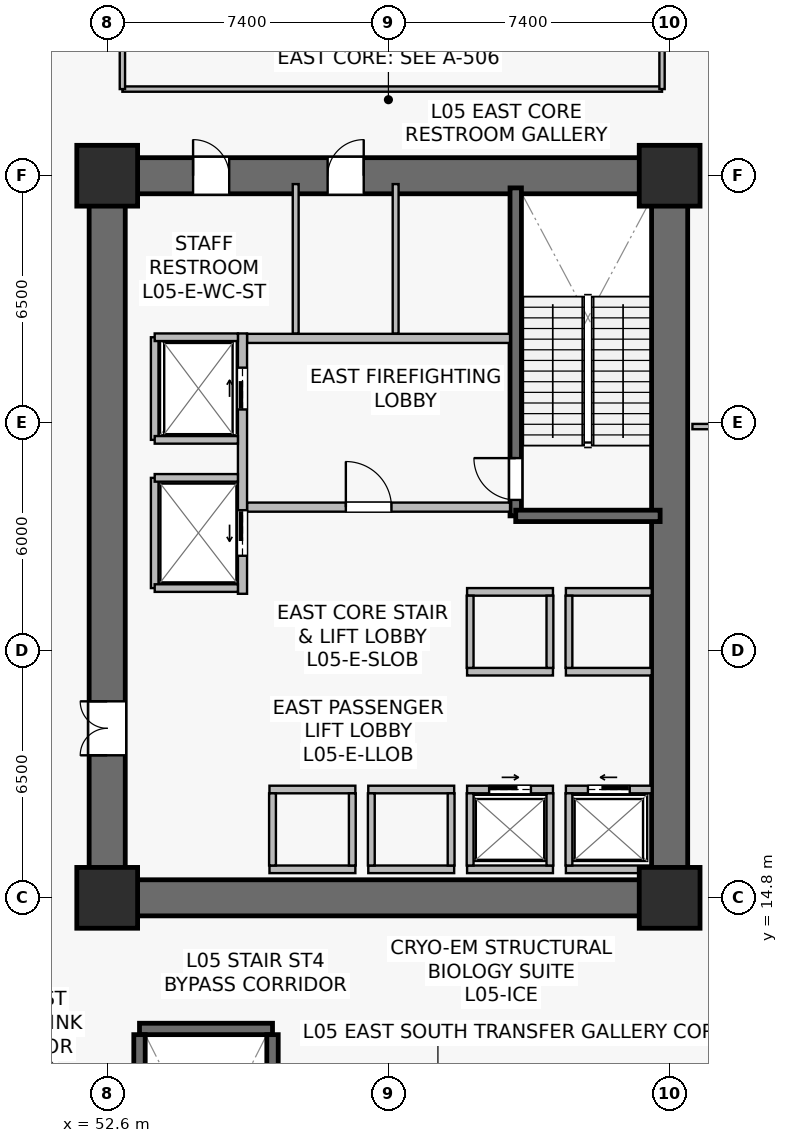
"""IFC4 building model, lengths in metres.
Left out: names, types, materials, properties, quantities, classifications, styles, units other than length and angle.
Written with IfcOpenShell. Run it as: python <this file> out.ifc"""

import sys

from ifc_helpers import new_model, si_unit, direction, frame, frame_2d, origin, origin_2d, place, context, subcontext, project, spatial, rectangle, extrude, source, transform, mapped, element, fill, save


model = new_model("IFC4")
c1 = context("Model", 3, precision=1e-05, world=origin(), true_north=direction((0.0, 1.0)))
c2 = subcontext(c1, "Body", "Model", "MODEL_VIEW")
j1 = project(units=[si_unit("LENGTHUNIT", "METRE"), si_unit("PLANEANGLEUNIT", "RADIAN")], contexts=[c1])
p1 = place(None, origin())
s1 = spatial("IfcSite", under=j1, at=p1, CompositionType="ELEMENT")
p2 = place(p1, origin())
s2 = spatial("IfcBuilding", under=s1, at=p2, CompositionType="ELEMENT")
p3 = place(p2, frame((0.0, 0.0, 19.8)))
s3 = spatial("IfcBuildingStorey", under=s2, at=p3, CompositionType="ELEMENT", Elevation=19.8)
p4 = place(p3, frame((52.125, 14.8, 0.0), z_axis=(0.0, 0.0, 1.0), x_axis=(1.0, 0.0, 0.0)))
e1 = element("IfcWall", 1, at=p4, inside=s3, PredefinedType="SHEAR", context=c2, shape_type="SweptSolid", body=[
    extrude(rectangle(XDim=15.75, YDim=0.95, at=frame_2d((7.875, 0.0))), origin(), (0.0, 0.0, 1.0), 5.08),
])
p5 = place(p3, frame((52.125, 33.8, 0.0), z_axis=(0.0, 0.0, 1.0), x_axis=(1.0, 0.0, 0.0)))
e2 = element("IfcWall", 2, at=p5, inside=s3, PredefinedType="SHEAR", context=c2, shape_type="SweptSolid", body=[
    extrude(rectangle(XDim=15.75, YDim=0.95, at=frame_2d((7.875, 0.0))), origin(), (0.0, 0.0, 1.0), 5.08),
])
p6 = place(p5, frame((6.275, 0.0, 0.0)))
e3 = element("IfcOpeningElement", 3, at=p6, cuts=e2, PredefinedType="OPENING", context=c2, shape_type="SweptSolid", body=[
    extrude(rectangle(XDim=0.95, YDim=2.15, at=frame_2d((0.475, 1.075))), frame((0.0, 0.485, 0.0), z_axis=(0.0, -1.0, 0.0), x_axis=(1.0, 0.0, 0.0)), (0.0, 0.0, 1.0), 0.97),
])
p7 = place(p5, frame((2.735, 0.0, 0.0)))
e4 = element("IfcOpeningElement", 4, at=p7, cuts=e2, PredefinedType="OPENING", context=c2, shape_type="SweptSolid", body=[
    extrude(rectangle(XDim=0.95, YDim=2.15, at=frame_2d((0.475, 1.075))), frame((0.0, 0.485, 0.0), z_axis=(0.0, -1.0, 0.0), x_axis=(1.0, 0.0, 0.0)), (0.0, 0.0, 1.0), 0.97),
])
p8 = place(p3, frame((52.6, 15.275, 0.0), z_axis=(0.0, 0.0, 1.0), x_axis=(0.0, 1.0, 0.0)))
e5 = element("IfcWall", 5, at=p8, inside=s3, PredefinedType="SHEAR", context=c2, shape_type="SweptSolid", body=[
    extrude(rectangle(XDim=18.05, YDim=0.95, at=frame_2d((9.025, 0.0))), origin(), (0.0, 0.0, 1.0), 5.08),
])
p9 = place(p8, frame((3.275, 0.0, 0.0)))
e6 = element("IfcOpeningElement", 6, at=p9, cuts=e5, PredefinedType="OPENING", context=c2, shape_type="SweptSolid", body=[
    extrude(rectangle(XDim=1.42, YDim=2.2, at=frame_2d((0.71, 1.1))), frame((0.0, 0.485, 0.0), z_axis=(0.0, -1.0, 0.0), x_axis=(1.0, 0.0, 0.0)), (0.0, 0.0, 1.0), 0.97),
])
p10 = place(p3, frame((67.4, 15.275, 0.0), z_axis=(0.0, 0.0, 1.0), x_axis=(0.0, 1.0, 0.0)))
e7 = element("IfcWall", 7, at=p10, inside=s3, PredefinedType="SHEAR", context=c2, shape_type="SweptSolid", body=[
    extrude(rectangle(XDim=18.05, YDim=0.95, at=frame_2d((9.025, 0.0))), origin(), (0.0, 0.0, 1.0), 5.08),
])
p11 = place(p3, frame((63.35, 24.85, 0.0), z_axis=(0.0, 0.0, 1.0), x_axis=(0.0, 1.0, 0.0)))
e8 = element("IfcWall", 8, at=p11, inside=s3, PredefinedType="SHEAR", context=c2, shape_type="SweptSolid", body=[
    extrude(rectangle(XDim=8.63, YDim=0.3, at=frame_2d((4.315, 0.0))), origin(), (0.0, 0.0, 1.0), 5.08),
])
p12 = place(p11, frame((0.42, 0.0, 0.0)))
e9 = element("IfcOpeningElement", 9, at=p12, cuts=e8, PredefinedType="OPENING", context=c2, shape_type="SweptSolid", body=[
    extrude(rectangle(XDim=1.1, YDim=2.15, at=frame_2d((0.55, 1.075))), frame((0.0, 0.16, 0.0), z_axis=(0.0, -1.0, 0.0), x_axis=(1.0, 0.0, 0.0)), (0.0, 0.0, 1.0), 0.32),
])
p13 = place(p3, frame((63.35, 24.85, 0.0), z_axis=(0.0, 0.0, 1.0), x_axis=(1.0, 0.0, 0.0)))
e10 = element("IfcWall", 10, at=p13, inside=s3, PredefinedType="SHEAR", context=c2, shape_type="SweptSolid", body=[
    extrude(rectangle(XDim=3.8, YDim=0.3, at=frame_2d((1.9, 0.0))), origin(), (0.0, 0.0, 1.0), 5.08),
])
p14 = place(p3, frame((53.45, 11.35, 0.0), z_axis=(0.0, 0.0, 1.0), x_axis=(1.0, 0.0, 0.0)))
e11 = element("IfcWall", 11, at=p14, inside=s3, PredefinedType="SHEAR", context=c2, shape_type="SweptSolid", body=[
    extrude(rectangle(XDim=3.5, YDim=0.3, at=frame_2d((1.75, 0.0))), origin(), (0.0, 0.0, 1.0), 5.08),
])
p15 = place(p3, frame((53.45, 3.2, 0.0), z_axis=(0.0, 0.0, 1.0), x_axis=(0.0, 1.0, 0.0)))
e12 = element("IfcWall", 12, at=p15, inside=s3, PredefinedType="SHEAR", context=c2, shape_type="SweptSolid", body=[
    extrude(rectangle(XDim=8.0, YDim=0.3, at=frame_2d((4.0, 0.0))), origin(), (0.0, 0.0, 1.0), 5.08),
])
p16 = place(p3, frame((56.95, 3.2, 0.0), z_axis=(0.0, 0.0, 1.0), x_axis=(0.0, 1.0, 0.0)))
e13 = element("IfcWall", 13, at=p16, inside=s3, PredefinedType="SHEAR", context=c2, shape_type="SweptSolid", body=[
    extrude(rectangle(XDim=8.0, YDim=0.3, at=frame_2d((4.0, 0.0))), origin(), (0.0, 0.0, 1.0), 5.08),
])
p17 = place(p16, frame((0.25, 0.0, 0.0)))
e14 = element("IfcOpeningElement", 14, at=p17, cuts=e13, PredefinedType="OPENING", context=c2, shape_type="SweptSolid", body=[
    extrude(rectangle(XDim=1.1, YDim=2.15, at=frame_2d((0.55, 1.075))), frame((0.0, 0.16, 0.0), z_axis=(0.0, -1.0, 0.0), x_axis=(1.0, 0.0, 0.0)), (0.0, 0.0, 1.0), 0.32),
])
m1 = source(origin(), c2, "Body", "SweptSolid", [
    extrude(rectangle(XDim=1.6, YDim=1.6, at=origin_2d()), origin(), (0.0, 0.0, 1.0), 5.4),
])
for number, where, z_axis, x_axis in (
    (15, (52.6, 14.8, 0.0), (0.0, 0.0, 1.0), (1.0, 0.0, 0.0)),
    (16, (67.4, 14.8, 0.0), (0.0, 0.0, 1.0), (1.0, 0.0, 0.0)),
    (17, (52.6, 33.8, 0.0), (0.0, 0.0, 1.0), (1.0, 0.0, 0.0)),
    (18, (67.4, 33.8, 0.0), (0.0, 0.0, 1.0), (1.0, 0.0, 0.0)),
):
    element("IfcColumn", number, at=place(p3, frame(where, z_axis=z_axis, x_axis=x_axis)), inside=s3, PredefinedType="COLUMN", context=c2, shape_type="MappedRepresentation", body=[
        mapped(m1, transform((0.0, 0.0, 0.0), scale=1.0)),
    ])
p18 = place(p3, frame((56.28, 25.08, 0.0), z_axis=(0.0, 0.0, 1.0), x_axis=(1.0, 0.0, 0.0)))
e19 = element("IfcWall", 19, at=p18, inside=s3, PredefinedType="SOLIDWALL", context=c2, shape_type="SweptSolid", body=[
    extrude(rectangle(XDim=6.92, YDim=0.24, at=frame_2d((3.46, 0.0))), origin(), (0.0, 0.0, 1.0), 4.365),
])
p19 = place(p18, frame((2.6, 0.0, 0.0)))
e20 = element("IfcOpeningElement", 20, at=p19, cuts=e19, PredefinedType="OPENING", context=c2, shape_type="SweptSolid", body=[
    extrude(rectangle(XDim=1.2, YDim=2.16, at=frame_2d((0.6, 1.08))), frame((0.0, 0.13, 0.0), z_axis=(0.0, -1.0, 0.0), x_axis=(1.0, 0.0, 0.0)), (0.0, 0.0, 1.0), 0.26),
])
p20 = place(p3, frame((56.28, 29.52, 0.0), z_axis=(0.0, 0.0, 1.0), x_axis=(1.0, 0.0, 0.0)))
e21 = element("IfcWall", 21, at=p20, inside=s3, PredefinedType="SOLIDWALL", context=c2, shape_type="SweptSolid", body=[
    extrude(rectangle(XDim=6.92, YDim=0.24, at=frame_2d((3.46, 0.0))), origin(), (0.0, 0.0, 1.0), 4.365),
])
p21 = place(p3, frame((56.16, 22.8, 0.0), z_axis=(0.0, 0.0, 1.0), x_axis=(0.0, 1.0, 0.0)))
e22 = element("IfcWall", 22, at=p21, inside=s3, PredefinedType="SOLIDWALL", context=c2, shape_type="SweptSolid", body=[
    extrude(rectangle(XDim=6.85, YDim=0.24, at=frame_2d((3.425, 0.0))), origin(), (0.0, 0.0, 1.0), 4.165),
])
p22 = place(p21, frame((4.85, 0.0, 0.0)))
e23 = element("IfcOpeningElement", 23, at=p22, cuts=e22, PredefinedType="OPENING", context=c2, shape_type="SweptSolid", body=[
    extrude(rectangle(XDim=1.1, YDim=2.22, at=frame_2d((0.55, 1.11))), frame((0.0, 0.13, 0.0), z_axis=(0.0, -1.0, 0.0), x_axis=(1.0, 0.0, 0.0)), (0.0, 0.0, 1.0), 0.26),
])
p23 = place(p21, frame((1.0, 0.0, 0.0)))
e24 = element("IfcOpeningElement", 24, at=p23, cuts=e22, PredefinedType="OPENING", context=c2, shape_type="SweptSolid", body=[
    extrude(rectangle(XDim=1.2, YDim=2.22, at=frame_2d((0.6, 1.11))), frame((0.0, 0.13, 0.0), z_axis=(0.0, -1.0, 0.0), x_axis=(1.0, 0.0, 0.0)), (0.0, 0.0, 1.0), 0.26),
])
p24 = place(p3, frame((64.67, 17.65, 0.0), z_axis=(0.0, 0.0, 1.0), x_axis=(1.0, 0.0, 0.0)))
e25 = element("IfcWall", 25, at=p24, inside=s3, PredefinedType="SOLIDWALL", context=c2, shape_type="SweptSolid", body=[
    extrude(rectangle(XDim=2.26, YDim=0.2, at=frame_2d((1.13, 0.0))), origin(), (0.0, 0.0, 1.0), 5.08),
])
p25 = place(p24, frame((0.58, 0.0, 0.0)))
e26 = element("IfcOpeningElement", 26, at=p25, cuts=e25, PredefinedType="OPENING", context=c2, shape_type="SweptSolid", body=[
    extrude(rectangle(XDim=1.1, YDim=2.22, at=frame_2d((0.55, 1.11))), frame((0.0, 0.11, 0.0), z_axis=(0.0, -1.0, 0.0), x_axis=(1.0, 0.0, 0.0)), (0.0, 0.0, 1.0), 0.22),
])
p26 = place(p3, frame((64.67, 15.55, 0.0), z_axis=(0.0, 0.0, 1.0), x_axis=(1.0, 0.0, 0.0)))
e27 = element("IfcWall", 27, at=p26, inside=s3, PredefinedType="SOLIDWALL", context=c2, shape_type="SweptSolid", body=[
    extrude(rectangle(XDim=2.26, YDim=0.2, at=frame_2d((1.13, 0.0))), origin(), (0.0, 0.0, 1.0), 5.08),
])
p27 = place(p3, frame((64.75, 15.65, 0.0), z_axis=(0.0, 0.0, 1.0), x_axis=(0.0, 1.0, 0.0)))
e28 = element("IfcWall", 28, at=p27, inside=s3, PredefinedType="SOLIDWALL", context=c2, shape_type="SweptSolid", body=[
    extrude(rectangle(XDim=1.9, YDim=0.18, at=frame_2d((0.95, 0.0))), origin(), (0.0, 0.0, 1.0), 5.08),
])
p28 = place(p3, frame((62.07, 17.65, 0.0), z_axis=(0.0, 0.0, 1.0), x_axis=(1.0, 0.0, 0.0)))
e29 = element("IfcWall", 29, at=p28, inside=s3, PredefinedType="SOLIDWALL", context=c2, shape_type="SweptSolid", body=[
    extrude(rectangle(XDim=2.26, YDim=0.2, at=frame_2d((1.13, 0.0))), origin(), (0.0, 0.0, 1.0), 5.08),
])
p29 = place(p28, frame((0.58, 0.0, 0.0)))
e30 = element("IfcOpeningElement", 30, at=p29, cuts=e29, PredefinedType="OPENING", context=c2, shape_type="SweptSolid", body=[
    extrude(rectangle(XDim=1.1, YDim=2.22, at=frame_2d((0.55, 1.11))), frame((0.0, 0.11, 0.0), z_axis=(0.0, -1.0, 0.0), x_axis=(1.0, 0.0, 0.0)), (0.0, 0.0, 1.0), 0.22),
])
p30 = place(p3, frame((62.07, 15.55, 0.0), z_axis=(0.0, 0.0, 1.0), x_axis=(1.0, 0.0, 0.0)))
e31 = element("IfcWall", 31, at=p30, inside=s3, PredefinedType="SOLIDWALL", context=c2, shape_type="SweptSolid", body=[
    extrude(rectangle(XDim=2.26, YDim=0.2, at=frame_2d((1.13, 0.0))), origin(), (0.0, 0.0, 1.0), 5.08),
])
for number, where, z_axis, x_axis in (
    (32, (62.15, 15.65, 0.0), (0.0, 0.0, 1.0), (0.0, 1.0, 0.0)),
    (33, (64.25, 15.65, 0.0), (0.0, 0.0, 1.0), (0.0, 1.0, 0.0)),
):
    element("IfcWall", number, at=place(p3, frame(where, z_axis=z_axis, x_axis=x_axis)), inside=s3, PredefinedType="SOLIDWALL", context=c2, shape_type="SweptSolid", body=[
        extrude(rectangle(XDim=1.9, YDim=0.18, at=frame_2d((0.95, 0.0))), origin(), (0.0, 0.0, 1.0), 5.08),
    ])
for number, where, z_axis, x_axis in (
    (34, (59.47, 17.65, 0.0), (0.0, 0.0, 1.0), (1.0, 0.0, 0.0)),
    (35, (59.47, 15.55, 0.0), (0.0, 0.0, 1.0), (1.0, 0.0, 0.0)),
):
    element("IfcWall", number, at=place(p3, frame(where, z_axis=z_axis, x_axis=x_axis)), inside=s3, PredefinedType="SOLIDWALL", context=c2, shape_type="SweptSolid", body=[
        extrude(rectangle(XDim=2.26, YDim=0.2, at=frame_2d((1.13, 0.0))), origin(), (0.0, 0.0, 1.0), 4.365),
    ])
for number, where, z_axis, x_axis in (
    (36, (59.55, 15.65, 0.0), (0.0, 0.0, 1.0), (0.0, 1.0, 0.0)),
    (37, (61.65, 15.65, 0.0), (0.0, 0.0, 1.0), (0.0, 1.0, 0.0)),
):
    element("IfcWall", number, at=place(p3, frame(where, z_axis=z_axis, x_axis=x_axis)), inside=s3, PredefinedType="SOLIDWALL", context=c2, shape_type="SweptSolid", body=[
        extrude(rectangle(XDim=1.9, YDim=0.18, at=frame_2d((0.95, 0.0))), origin(), (0.0, 0.0, 1.0), 5.08),
    ])
for number, where, z_axis, x_axis in (
    (38, (56.87, 17.65, 0.0), (0.0, 0.0, 1.0), (1.0, 0.0, 0.0)),
    (39, (56.87, 15.55, 0.0), (0.0, 0.0, 1.0), (1.0, 0.0, 0.0)),
):
    element("IfcWall", number, at=place(p3, frame(where, z_axis=z_axis, x_axis=x_axis)), inside=s3, PredefinedType="SOLIDWALL", context=c2, shape_type="SweptSolid", body=[
        extrude(rectangle(XDim=2.26, YDim=0.2, at=frame_2d((1.13, 0.0))), origin(), (0.0, 0.0, 1.0), 5.08),
    ])
for number, where, z_axis, x_axis in (
    (40, (56.95, 15.65, 0.0), (0.0, 0.0, 1.0), (0.0, 1.0, 0.0)),
    (41, (59.05, 15.65, 0.0), (0.0, 0.0, 1.0), (0.0, 1.0, 0.0)),
):
    element("IfcWall", number, at=place(p3, frame(where, z_axis=z_axis, x_axis=x_axis)), inside=s3, PredefinedType="SOLIDWALL", context=c2, shape_type="SweptSolid", body=[
        extrude(rectangle(XDim=1.9, YDim=0.18, at=frame_2d((0.95, 0.0))), origin(), (0.0, 0.0, 1.0), 5.08),
    ])
for number, where, z_axis, x_axis in (
    (42, (64.67, 20.75, 0.0), (0.0, 0.0, 1.0), (1.0, 0.0, 0.0)),
    (43, (64.67, 22.85, 0.0), (0.0, 0.0, 1.0), (1.0, 0.0, 0.0)),
):
    element("IfcWall", number, at=place(p3, frame(where, z_axis=z_axis, x_axis=x_axis)), inside=s3, PredefinedType="SOLIDWALL", context=c2, shape_type="SweptSolid", body=[
        extrude(rectangle(XDim=2.26, YDim=0.2, at=frame_2d((1.13, 0.0))), origin(), (0.0, 0.0, 1.0), 5.08),
    ])
p31 = place(p3, frame((64.75, 20.85, 0.0), z_axis=(0.0, 0.0, 1.0), x_axis=(0.0, 1.0, 0.0)))
e44 = element("IfcWall", 44, at=p31, inside=s3, PredefinedType="SOLIDWALL", context=c2, shape_type="SweptSolid", body=[
    extrude(rectangle(XDim=1.9, YDim=0.18, at=frame_2d((0.95, 0.0))), origin(), (0.0, 0.0, 1.0), 5.08),
])
for number, where, z_axis, x_axis in (
    (45, (62.07, 20.75, 0.0), (0.0, 0.0, 1.0), (1.0, 0.0, 0.0)),
    (46, (62.07, 22.85, 0.0), (0.0, 0.0, 1.0), (1.0, 0.0, 0.0)),
):
    element("IfcWall", number, at=place(p3, frame(where, z_axis=z_axis, x_axis=x_axis)), inside=s3, PredefinedType="SOLIDWALL", context=c2, shape_type="SweptSolid", body=[
        extrude(rectangle(XDim=2.26, YDim=0.2, at=frame_2d((1.13, 0.0))), origin(), (0.0, 0.0, 1.0), 5.08),
    ])
for number, where, z_axis, x_axis in (
    (47, (62.15, 20.85, 0.0), (0.0, 0.0, 1.0), (0.0, 1.0, 0.0)),
    (48, (64.25, 20.85, 0.0), (0.0, 0.0, 1.0), (0.0, 1.0, 0.0)),
):
    element("IfcWall", number, at=place(p3, frame(where, z_axis=z_axis, x_axis=x_axis)), inside=s3, PredefinedType="SOLIDWALL", context=c2, shape_type="SweptSolid", body=[
        extrude(rectangle(XDim=1.9, YDim=0.18, at=frame_2d((0.95, 0.0))), origin(), (0.0, 0.0, 1.0), 5.08),
    ])
p32 = place(p3, frame((53.85, 26.85, 0.0), z_axis=(0.0, 0.0, 1.0), x_axis=(0.0, 1.0, 0.0)))
e49 = element("IfcWall", 49, at=p32, inside=s3, PredefinedType="SOLIDWALL", context=c2, shape_type="SweptSolid", body=[
    extrude(rectangle(XDim=2.7, YDim=0.2, at=frame_2d((1.35, 0.0))), origin(), (0.0, 0.0, 1.0), 5.08),
])
p33 = place(p3, frame((53.85, 29.55, 0.0), z_axis=(0.0, 0.0, 1.0), x_axis=(1.0, 0.0, 0.0)))
e50 = element("IfcWall", 50, at=p33, inside=s3, PredefinedType="SOLIDWALL", context=c2, shape_type="SweptSolid", body=[
    extrude(rectangle(XDim=2.19, YDim=0.2, at=frame_2d((1.095, 0.0))), origin(), (0.0, 0.0, 1.0), 5.08),
])
p34 = place(p3, frame((53.85, 26.85, 0.0), z_axis=(0.0, 0.0, 1.0), x_axis=(1.0, 0.0, 0.0)))
e51 = element("IfcWall", 51, at=p34, inside=s3, PredefinedType="SOLIDWALL", context=c2, shape_type="SweptSolid", body=[
    extrude(rectangle(XDim=2.19, YDim=0.2, at=frame_2d((1.095, 0.0))), origin(), (0.0, 0.0, 1.0), 4.477),
])
p35 = place(p3, frame((53.85, 22.95, 0.0), z_axis=(0.0, 0.0, 1.0), x_axis=(0.0, 1.0, 0.0)))
e52 = element("IfcWall", 52, at=p35, inside=s3, PredefinedType="SOLIDWALL", context=c2, shape_type="SweptSolid", body=[
    extrude(rectangle(XDim=2.9, YDim=0.2, at=frame_2d((1.45, 0.0))), origin(), (0.0, 0.0, 1.0), 4.165),
])
for number, where, z_axis, x_axis in (
    (53, (53.85, 25.85, 0.0), (0.0, 0.0, 1.0), (1.0, 0.0, 0.0)),
    (54, (53.85, 22.95, 0.0), (0.0, 0.0, 1.0), (1.0, 0.0, 0.0)),
):
    element("IfcWall", number, at=place(p3, frame(where, z_axis=z_axis, x_axis=x_axis)), inside=s3, PredefinedType="SOLIDWALL", context=c2, shape_type="SweptSolid", body=[
        extrude(rectangle(XDim=2.19, YDim=0.2, at=frame_2d((1.095, 0.0))), origin(), (0.0, 0.0, 1.0), 5.08),
    ])
p36 = place(p3, frame((60.19, 29.65, 0.0), z_axis=(0.0, 0.0, 1.0), x_axis=(0.0, 1.0, 0.0)))
e55 = element("IfcWall", 55, at=p36, inside=s3, PredefinedType="PLUMBINGWALL", context=c2, shape_type="SweptSolid", body=[
    extrude(rectangle(XDim=3.93, YDim=0.155, at=frame_2d((1.965, 0.0))), origin(), (0.0, 0.0, 1.0), 4.365),
])
p37 = place(p3, frame((57.56, 29.65, 0.0), z_axis=(0.0, 0.0, 1.0), x_axis=(0.0, 1.0, 0.0)))
e56 = element("IfcWall", 56, at=p37, inside=s3, PredefinedType="PLUMBINGWALL", context=c2, shape_type="SweptSolid", body=[
    extrude(rectangle(XDim=3.93, YDim=0.155, at=frame_2d((1.965, 0.0))), origin(), (0.0, 0.0, 1.0), 5.08),
])
p38 = place(p3, frame((53.0, 36.08, 0.0), z_axis=(0.0, 0.0, 1.0), x_axis=(1.0, 0.0, 0.0)))
e57 = element("IfcWall", 57, at=p38, inside=s3, PredefinedType="PARTITIONING", context=c2, shape_type="SweptSolid", body=[
    extrude(rectangle(XDim=14.2, YDim=0.14, at=frame_2d((7.1, 0.0))), origin(), (0.0, 0.0, 1.0), 4.365),
])
p39 = place(p3, frame((53.0, 36.08, 0.0), z_axis=(0.0, 0.0, 1.0), x_axis=(0.0, 1.0, 0.0)))
e58 = element("IfcWall", 58, at=p39, inside=s3, PredefinedType="PARTITIONING", context=c2, shape_type="SweptSolid", body=[
    extrude(rectangle(XDim=3.24, YDim=0.14, at=frame_2d((1.62, 0.0))), origin(), (0.0, 0.0, 1.0), 5.08),
])
p40 = place(p3, frame((67.2, 36.08, 0.0), z_axis=(0.0, 0.0, 1.0), x_axis=(0.0, 1.0, 0.0)))
e59 = element("IfcWall", 59, at=p40, inside=s3, PredefinedType="PARTITIONING", context=c2, shape_type="SweptSolid", body=[
    extrude(rectangle(XDim=3.24, YDim=0.14, at=frame_2d((1.62, 0.0))), origin(), (0.0, 0.0, 1.0), 4.365),
])
p41 = place(p3, frame((68.0, 27.2, 0.0), z_axis=(0.0, 0.0, 1.0), x_axis=(1.0, 0.0, 0.0)))
e60 = element("IfcWall", 60, at=p41, inside=s3, PredefinedType="PARTITIONING", context=c2, shape_type="SweptSolid", body=[
    extrude(rectangle(XDim=7.65, YDim=0.14, at=frame_2d((3.825, 0.0))), origin(), (0.0, 0.0, 1.0), 4.465),
])
m2 = source(origin(), c2, "Body", "SweptSolid", [
    extrude(rectangle(XDim=1.1, YDim=2.15, at=frame_2d((0.55, 1.075))), frame((0.0, 0.025, 0.0), z_axis=(0.0, -1.0, 0.0), x_axis=(1.0, 0.0, 0.0)), (0.0, 0.0, 1.0), 0.05),
])
p42 = place(p12, origin())
e61 = element("IfcDoor", 61, at=p42, inside=s3, OperationType="SINGLE_SWING_RIGHT", PredefinedType="DOOR", context=c2, shape_type="MappedRepresentation", body=[
    mapped(m2, transform((0.0, 0.0, 0.0), scale=1.0)),
])
fill(e9, e61)
m3 = source(origin(), c2, "Body", "SweptSolid", [
    extrude(rectangle(XDim=1.2, YDim=2.16, at=frame_2d((0.6, 1.08))), frame((0.0, 0.025, 0.0), z_axis=(0.0, -1.0, 0.0), x_axis=(1.0, 0.0, 0.0)), (0.0, 0.0, 1.0), 0.05),
])
p43 = place(p19, origin())
e62 = element("IfcDoor", 62, at=p43, inside=s3, OperationType="SINGLE_SWING_LEFT", PredefinedType="DOOR", context=c2, shape_type="MappedRepresentation", body=[
    mapped(m3, transform((0.0, 0.0, 0.0), scale=1.0)),
])
fill(e20, e62)
m4 = source(origin(), c2, "Body", "SweptSolid", [
    extrude(rectangle(XDim=1.1, YDim=2.22, at=frame_2d((0.55, 1.11))), frame((0.0, 0.025, 0.0), z_axis=(0.0, -1.0, 0.0), x_axis=(1.0, 0.0, 0.0)), (0.0, 0.0, 1.0), 0.05),
])
p44 = place(p25, origin())
e63 = element("IfcDoor", 63, at=p44, inside=s3, OperationType="SLIDING_TO_LEFT", PredefinedType="USERDEFINED", context=c2, shape_type="MappedRepresentation", body=[
    mapped(m4, transform((0.0, 0.0, 0.0), scale=1.0)),
])
fill(e26, e63)
p45 = place(p29, origin())
e64 = element("IfcDoor", 64, at=p45, inside=s3, OperationType="SLIDING_TO_RIGHT", PredefinedType="USERDEFINED", context=c2, shape_type="MappedRepresentation", body=[
    mapped(m4, transform((0.0, 0.0, 0.0), scale=1.0)),
])
fill(e30, e64)
p46 = place(p22, origin())
e65 = element("IfcDoor", 65, at=p46, inside=s3, OperationType="SLIDING_TO_RIGHT", PredefinedType="USERDEFINED", context=c2, shape_type="MappedRepresentation", body=[
    mapped(m4, transform((0.0, 0.0, 0.0), scale=1.0)),
])
fill(e23, e65)
m5 = source(origin(), c2, "Body", "SweptSolid", [
    extrude(rectangle(XDim=1.2, YDim=2.22, at=frame_2d((0.6, 1.11))), frame((0.0, 0.025, 0.0), z_axis=(0.0, -1.0, 0.0), x_axis=(1.0, 0.0, 0.0)), (0.0, 0.0, 1.0), 0.05),
])
p47 = place(p23, origin())
e66 = element("IfcDoor", 66, at=p47, inside=s3, OperationType="SLIDING_TO_LEFT", PredefinedType="USERDEFINED", context=c2, shape_type="MappedRepresentation", body=[
    mapped(m5, transform((0.0, 0.0, 0.0), scale=1.0)),
])
fill(e24, e66)
m6 = source(origin(), c2, "Body", "SweptSolid", [
    extrude(rectangle(XDim=1.42, YDim=2.2, at=frame_2d((0.71, 1.1))), frame((0.0, 0.025, 0.0), z_axis=(0.0, -1.0, 0.0), x_axis=(1.0, 0.0, 0.0)), (0.0, 0.0, 1.0), 0.05),
])
p48 = place(p9, origin())
e67 = element("IfcDoor", 67, at=p48, inside=s3, OperationType="DOUBLE_DOOR_SINGLE_SWING", PredefinedType="DOOR", context=c2, shape_type="MappedRepresentation", body=[
    mapped(m6, transform((0.0, 0.0, 0.0), scale=1.0)),
])
fill(e6, e67)
m7 = source(origin(), c2, "Body", "SweptSolid", [
    extrude(rectangle(XDim=0.95, YDim=2.15, at=frame_2d((0.475, 1.075))), frame((0.0, 0.025, 0.0), z_axis=(0.0, -1.0, 0.0), x_axis=(1.0, 0.0, 0.0)), (0.0, 0.0, 1.0), 0.05),
])
p49 = place(p6, origin())
e68 = element("IfcDoor", 68, at=p49, inside=s3, OperationType="SINGLE_SWING_RIGHT", PredefinedType="DOOR", context=c2, shape_type="MappedRepresentation", body=[
    mapped(m7, transform((0.0, 0.0, 0.0), scale=1.0)),
])
fill(e3, e68)
p50 = place(p7, origin())
e69 = element("IfcDoor", 69, at=p50, inside=s3, OperationType="SINGLE_SWING_LEFT", PredefinedType="DOOR", context=c2, shape_type="MappedRepresentation", body=[
    mapped(m7, transform((0.0, 0.0, 0.0), scale=1.0)),
])
fill(e4, e69)
save(model, sys.argv[1])
